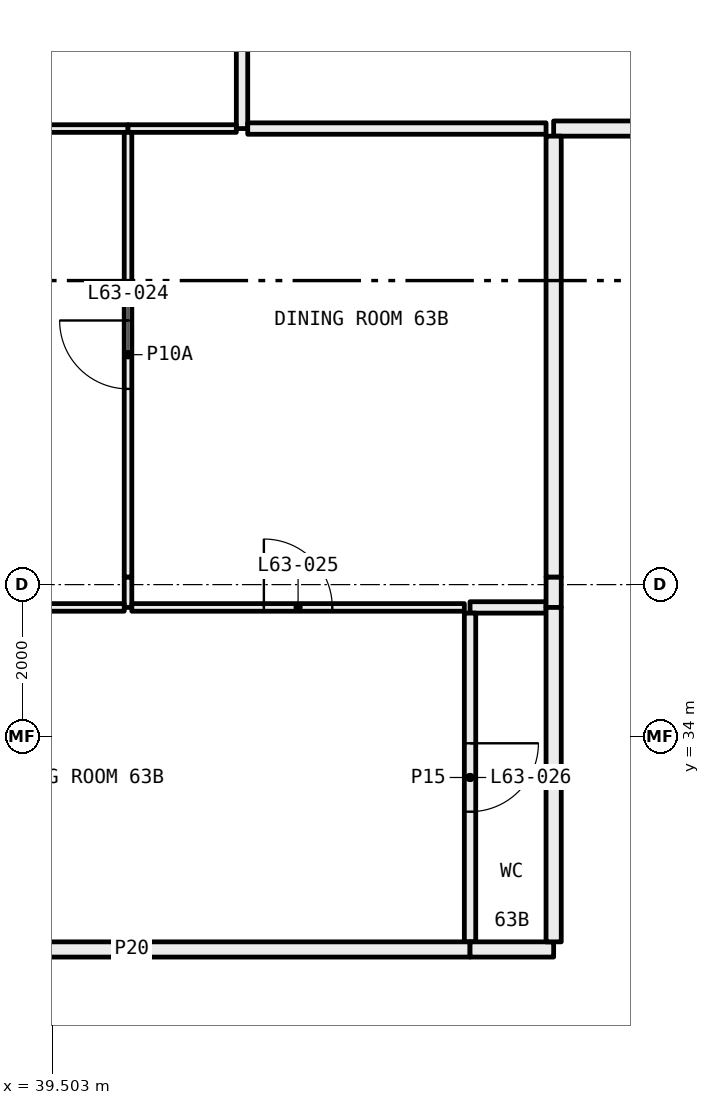
"""IFC4 building model, lengths in metres.
Left out: names, types, materials, properties, quantities, classifications, styles, units other than length and angle.
Written with IfcOpenShell. Run it as: python <this file> out.ifc"""

import sys

from ifc_helpers import new_model, si_unit, direction, frame, frame_2d, origin, place, context, subcontext, project, spatial, rectangle, extrude, element, fill, save


model = new_model("IFC4")
c1 = context("Model", 3, precision=1e-05, world=origin(), true_north=direction((0.0, 1.0)))
c2 = subcontext(c1, "Body", "Model", "MODEL_VIEW")
j1 = project(units=[si_unit("LENGTHUNIT", "METRE"), si_unit("PLANEANGLEUNIT", "RADIAN")], contexts=[c1])
p1 = place(None, origin())
s1 = spatial("IfcSite", under=j1, at=p1, CompositionType="ELEMENT")
p2 = place(p1, origin())
s2 = spatial("IfcBuilding", under=s1, at=p2, CompositionType="ELEMENT")
p3 = place(p2, frame((0.0, 0.0, 235.2)))
s3 = spatial("IfcBuildingStorey", under=s2, at=p3, CompositionType="ELEMENT", Elevation=235.2)
p4 = place(p3, frame((42.0, 42.0, 0.0), z_axis=(0.0, 0.0, 1.0), x_axis=(0.0, 1.0, 0.0)))
e1 = element("IfcWall", 1, at=p4, inside=s3, PredefinedType="PARTITIONING", context=c2, shape_type="SweptSolid", body=[
    extrude(rectangle(XDim=3.0, YDim=0.15, at=frame_2d((1.5, 0.0))), origin(), (0.0, 0.0, 1.0), 3.05),
])
p5 = place(p4, frame((1.05, 0.0, 0.0)))
e2 = element("IfcOpeningElement", 2, at=p5, cuts=e1, PredefinedType="OPENING", context=c2, shape_type="SweptSolid", body=[
    extrude(rectangle(XDim=0.9, YDim=2.1, at=frame_2d((0.45, 1.05))), frame((0.0, 0.085, 0.0), z_axis=(0.0, -1.0, 0.0), x_axis=(1.0, 0.0, 0.0)), (0.0, 0.0, 1.0), 0.17),
])
p6 = place(p3, frame((36.05, 42.0, 0.0), z_axis=(0.0, 0.0, 1.0), x_axis=(1.0, 0.0, 0.0)))
e3 = element("IfcWall", 3, at=p6, inside=s3, PredefinedType="PARTITIONING", context=c2, shape_type="SweptSolid", body=[
    extrude(rectangle(XDim=4.45, YDim=0.1, at=frame_2d((2.225, 0.0))), origin(), (0.0, 0.0, 1.0), 2.45),
])
p7 = place(p3, frame((40.5, 42.0, 0.0), z_axis=(0.0, 0.0, 1.0), x_axis=(1.0, 0.0, 0.0)))
e4 = element("IfcWall", 4, at=p7, inside=s3, PredefinedType="PARTITIONING", context=c2, shape_type="SweptSolid", body=[
    extrude(rectangle(XDim=1.425, YDim=0.1, at=frame_2d((0.712, 0.0))), origin(), (0.0, 0.0, 1.0), 3.05),
])
p8 = place(p3, frame((42.075, 42.0, 0.0), z_axis=(0.0, 0.0, 1.0), x_axis=(1.0, 0.0, 0.0)))
e5 = element("IfcWall", 5, at=p8, inside=s3, PredefinedType="PARTITIONING", context=c2, shape_type="SweptSolid", body=[
    extrude(rectangle(XDim=3.925, YDim=0.15, at=frame_2d((1.962, 0.0))), origin(), (0.0, 0.0, 1.0), 3.05),
])
p9 = place(p3, frame((46.1, 42.0, 0.0), z_axis=(0.0, 0.0, 1.0), x_axis=(1.0, 0.0, 0.0)))
e6 = element("IfcWall", 6, at=p9, inside=s3, PredefinedType="PARTITIONING", context=c2, shape_type="SweptSolid", body=[
    extrude(rectangle(XDim=1.8, YDim=0.2, at=frame_2d((0.9, 0.0))), origin(), (0.0, 0.0, 1.0), 3.05),
])
p10 = place(p3, frame((40.5, 35.7, 0.0), z_axis=(0.0, 0.0, 1.0), x_axis=(0.0, 1.0, 0.0)))
e7 = element("IfcWall", 7, at=p10, inside=s3, PredefinedType="PARTITIONING", context=c2, shape_type="SweptSolid", body=[
    extrude(rectangle(XDim=0.4, YDim=0.1, at=frame_2d((0.2, 0.0))), origin(), (0.0, 0.0, 1.0), 2.45),
])
p11 = place(p3, frame((40.5, 36.1, 0.0), z_axis=(0.0, 0.0, 1.0), x_axis=(0.0, 1.0, 0.0)))
e8 = element("IfcWall", 8, at=p11, inside=s3, PredefinedType="PARTITIONING", context=c2, shape_type="SweptSolid", body=[
    extrude(rectangle(XDim=5.85, YDim=0.1, at=frame_2d((2.925, 0.0))), origin(), (0.0, 0.0, 1.0), 3.05),
])
p12 = place(p11, frame((2.475, 0.0, 0.0)))
e9 = element("IfcOpeningElement", 9, at=p12, cuts=e8, PredefinedType="OPENING", context=c2, shape_type="SweptSolid", body=[
    extrude(rectangle(XDim=0.9, YDim=2.1, at=frame_2d((0.45, 1.05))), frame((0.0, 0.06, 0.0), z_axis=(0.0, -1.0, 0.0), x_axis=(1.0, 0.0, 0.0)), (0.0, 0.0, 1.0), 0.12),
])
p13 = place(p3, frame((36.55, 35.7, 0.0), z_axis=(0.0, 0.0, 1.0), x_axis=(1.0, 0.0, 0.0)))
e10 = element("IfcWall", 10, at=p13, inside=s3, PredefinedType="PARTITIONING", context=c2, shape_type="SweptSolid", body=[
    extrude(rectangle(XDim=3.9, YDim=0.1, at=frame_2d((1.95, 0.0))), origin(), (0.0, 0.0, 1.0), 3.05),
])
p14 = place(p3, frame((40.55, 35.7, 0.0), z_axis=(0.0, 0.0, 1.0), x_axis=(1.0, 0.0, 0.0)))
e11 = element("IfcWall", 11, at=p14, inside=s3, PredefinedType="PARTITIONING", context=c2, shape_type="SweptSolid", body=[
    extrude(rectangle(XDim=4.375, YDim=0.1, at=frame_2d((2.188, 0.0))), origin(), (0.0, 0.0, 1.0), 3.05),
])
p15 = place(p14, frame((1.738, 0.0, 0.0)))
e12 = element("IfcOpeningElement", 12, at=p15, cuts=e11, PredefinedType="OPENING", context=c2, shape_type="SweptSolid", body=[
    extrude(rectangle(XDim=0.9, YDim=2.1, at=frame_2d((0.45, 1.05))), frame((0.0, 0.06, 0.0), z_axis=(0.0, -1.0, 0.0), x_axis=(1.0, 0.0, 0.0)), (0.0, 0.0, 1.0), 0.12),
])
p16 = place(p3, frame((45.0, 35.7, 0.0), z_axis=(0.0, 0.0, 1.0), x_axis=(1.0, 0.0, 0.0)))
e13 = element("IfcWall", 13, at=p16, inside=s3, PredefinedType="PARTITIONING", context=c2, shape_type="SweptSolid", body=[
    extrude(rectangle(XDim=1.0, YDim=0.15, at=frame_2d((0.5, 0.0))), origin(), (0.0, 0.0, 1.0), 3.05),
])
p17 = place(p3, frame((46.1, 35.7, 0.0), z_axis=(0.0, 0.0, 1.0), x_axis=(0.0, 1.0, 0.0)))
e14 = element("IfcWall", 14, at=p17, inside=s3, PredefinedType="PARTITIONING", context=c2, shape_type="SweptSolid", body=[
    extrude(rectangle(XDim=0.4, YDim=0.2, at=frame_2d((0.2, 0.0))), origin(), (0.0, 0.0, 1.0), 2.45),
])
p18 = place(p3, frame((46.1, 36.1, 0.0), z_axis=(0.0, 0.0, 1.0), x_axis=(0.0, 1.0, 0.0)))
e15 = element("IfcWall", 15, at=p18, inside=s3, PredefinedType="PARTITIONING", context=c2, shape_type="SweptSolid", body=[
    extrude(rectangle(XDim=5.8, YDim=0.2, at=frame_2d((2.9, 0.0))), origin(), (0.0, 0.0, 1.0), 3.05),
])
p19 = place(p3, frame((45.0, 31.3, 0.0), z_axis=(0.0, 0.0, 1.0), x_axis=(0.0, 1.0, 0.0)))
e16 = element("IfcWall", 16, at=p19, inside=s3, PredefinedType="PARTITIONING", context=c2, shape_type="SweptSolid", body=[
    extrude(rectangle(XDim=4.325, YDim=0.15, at=frame_2d((2.163, 0.0))), origin(), (0.0, 0.0, 1.0), 3.05),
])
p20 = place(p19, frame((1.712, 0.0, 0.0)))
e17 = element("IfcOpeningElement", 17, at=p20, cuts=e16, PredefinedType="OPENING", context=c2, shape_type="SweptSolid", body=[
    extrude(rectangle(XDim=0.9, YDim=2.1, at=frame_2d((0.45, 1.05))), frame((0.0, 0.085, 0.0), z_axis=(0.0, -1.0, 0.0), x_axis=(1.0, 0.0, 0.0)), (0.0, 0.0, 1.0), 0.17),
])
p21 = place(p3, frame((36.1, 31.2, 0.0), z_axis=(0.0, 0.0, 1.0), x_axis=(1.0, 0.0, 0.0)))
e18 = element("IfcWall", 18, at=p21, inside=s3, PredefinedType="PARTITIONING", context=c2, shape_type="SweptSolid", body=[
    extrude(rectangle(XDim=8.9, YDim=0.2, at=frame_2d((4.45, 0.0))), origin(), (0.0, 0.0, 1.0), 3.05),
])
p22 = place(p3, frame((45.0, 31.2, 0.0), z_axis=(0.0, 0.0, 1.0), x_axis=(1.0, 0.0, 0.0)))
e19 = element("IfcWall", 19, at=p22, inside=s3, PredefinedType="PARTITIONING", context=c2, shape_type="SweptSolid", body=[
    extrude(rectangle(XDim=1.1, YDim=0.2, at=frame_2d((0.55, 0.0))), origin(), (0.0, 0.0, 1.0), 3.05),
])
p23 = place(p3, frame((46.1, 31.3, 0.0), z_axis=(0.0, 0.0, 1.0), x_axis=(0.0, 1.0, 0.0)))
e20 = element("IfcWall", 20, at=p23, inside=s3, PredefinedType="PARTITIONING", context=c2, shape_type="SweptSolid", body=[
    extrude(rectangle(XDim=4.4, YDim=0.2, at=frame_2d((2.2, 0.0))), origin(), (0.0, 0.0, 1.0), 3.05),
])
p24 = place(p12, origin())
e21 = element("IfcDoor", 21, at=p24, inside=s3, OperationType="SINGLE_SWING_LEFT", PredefinedType="DOOR", context=c2, shape_type="SweptSolid", body=[
    extrude(rectangle(XDim=0.9, YDim=2.1, at=frame_2d((0.45, 1.05))), frame((0.0, 0.025, 0.0), z_axis=(0.0, -1.0, 0.0), x_axis=(1.0, 0.0, 0.0)), (0.0, 0.0, 1.0), 0.05),
])
fill(e9, e21)
p25 = place(p15, origin())
e22 = element("IfcDoor", 22, at=p25, inside=s3, OperationType="SINGLE_SWING_RIGHT", PredefinedType="DOOR", context=c2, shape_type="SweptSolid", body=[
    extrude(rectangle(XDim=0.9, YDim=2.1, at=frame_2d((0.45, 1.05))), frame((0.0, 0.025, 0.0), z_axis=(0.0, -1.0, 0.0), x_axis=(1.0, 0.0, 0.0)), (0.0, 0.0, 1.0), 0.05),
])
fill(e12, e22)
p26 = place(p20, frame((0.9, 0.0, 0.0), x_axis=(-1.0, 0.0, 0.0)))
e23 = element("IfcDoor", 23, at=p26, inside=s3, OperationType="SINGLE_SWING_RIGHT", PredefinedType="DOOR", context=c2, shape_type="SweptSolid", body=[
    extrude(rectangle(XDim=0.9, YDim=2.1, at=frame_2d((0.45, 1.05))), frame((0.0, 0.025, 0.0), z_axis=(0.0, -1.0, 0.0), x_axis=(1.0, 0.0, 0.0)), (0.0, 0.0, 1.0), 0.05),
])
fill(e17, e23)
save(model, sys.argv[1])
